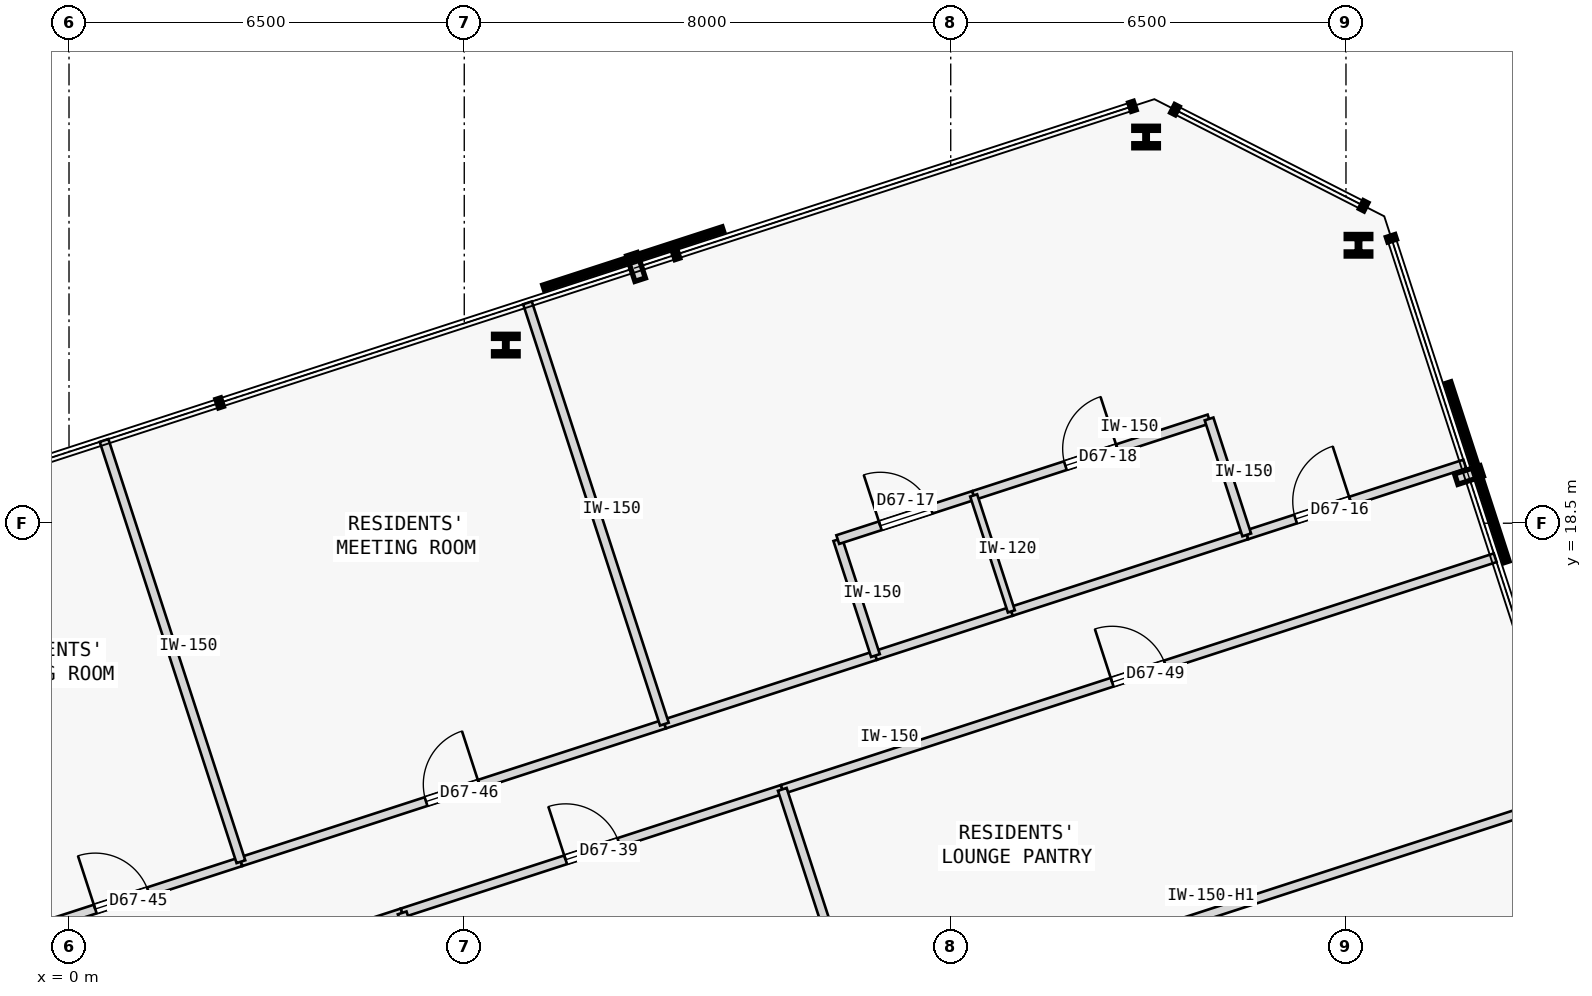
"""IFC4 building model, lengths in metres.
Left out: names, types, materials, properties, quantities, classifications, styles, units other than length and angle.
Written with IfcOpenShell. Run it as: python <this file> out.ifc"""

import sys

from ifc_helpers import new_model, si_unit, direction, frame, frame_2d, origin, origin_2d, place, context, subcontext, project, spatial, rectangle, i_section, extrude, element, fill, save


model = new_model("IFC4")
c1 = context("Model", 3, precision=1e-05, world=origin(), true_north=direction((0.0, 1.0)))
c2 = subcontext(c1, "Body", "Model", "MODEL_VIEW")
j1 = project(units=[si_unit("LENGTHUNIT", "METRE"), si_unit("PLANEANGLEUNIT", "RADIAN")], contexts=[c1])
p1 = place(None, origin())
s1 = spatial("IfcSite", under=j1, at=p1, CompositionType="ELEMENT")
p2 = place(p1, origin())
s2 = spatial("IfcBuilding", under=s1, at=p2, CompositionType="ELEMENT")
p3 = place(p2, frame((0.0, 0.0, 251.1)))
s3 = spatial("IfcBuildingStorey", under=s2, at=p3, CompositionType="ELEMENT", Elevation=251.1)
for number, where, z_axis, x_axis in (
    (1, (21.206, 23.071, 0.0), (0.0, 0.0, 1.0), (1.0, 0.0, 0.0)),
    (2, (17.713, 24.851, 0.0), (0.0, 0.0, 1.0), (1.0, 0.0, 0.0)),
    (3, (7.184, 21.43, 0.0), (0.0, 0.0, 1.0), (1.0, 0.0, 0.0)),
):
    element("IfcColumn", number, at=place(p3, frame(where, z_axis=z_axis, x_axis=x_axis)), inside=s3, PredefinedType="COLUMN", context=c2, shape_type="SweptSolid", body=[
        extrude(i_section(OverallWidth=0.405, OverallDepth=0.355, WebThickness=0.042, FlangeThickness=0.068, FilletRadius=0.015, at=origin_2d()), origin(), (0.0, 0.0, 1.0), 3.35),
    ])
p4 = place(p3, frame((9.791, 15.196, 0.0), z_axis=(0.0, 0.0, 1.0), x_axis=(0.951050780541, 0.309034646652, 0.0)))
e4 = element("IfcWall", 4, at=p4, inside=s3, PredefinedType="PARTITIONING", context=c2, shape_type="SweptSolid", body=[
    extrude(rectangle(XDim=3.65, YDim=0.15, at=frame_2d((1.825, 0.0))), origin(), (0.0, 0.0, 1.0), 2.95),
])
p5 = place(p3, frame((19.368, 18.308, 0.0), z_axis=(0.0, 0.0, 1.0), x_axis=(0.951052151329, 0.309030428036, 0.0)))
e5 = element("IfcWall", 5, at=p5, inside=s3, PredefinedType="PARTITIONING", context=c2, shape_type="SweptSolid", body=[
    extrude(rectangle(XDim=3.77, YDim=0.15, at=frame_2d((1.885, 0.0))), origin(), (0.0, 0.0, 1.0), 2.95),
])
p6 = place(p5, frame((0.844, 0.0, 0.0)))
e6 = element("IfcOpeningElement", 6, at=p6, cuts=e5, PredefinedType="OPENING", context=c2, shape_type="SweptSolid", body=[
    extrude(rectangle(XDim=0.95, YDim=2.15, at=frame_2d((0.475, 1.075))), frame((0.0, 0.085, 0.0), z_axis=(0.0, -1.0, 0.0), x_axis=(1.0, 0.0, 0.0)), (0.0, 0.0, 1.0), 0.17),
])
p7 = place(p3, frame((13.262, 16.324, 0.0), z_axis=(0.0, 0.0, 1.0), x_axis=(0.951045519245, 0.309050837767, 0.0)))
e7 = element("IfcWall", 7, at=p7, inside=s3, PredefinedType="PARTITIONING", context=c2, shape_type="SweptSolid", body=[
    extrude(rectangle(XDim=2.35, YDim=0.15, at=frame_2d((1.175, 0.0))), origin(), (0.0, 0.0, 1.0), 2.95),
])
p8 = place(p3, frame((15.497, 17.051, 0.0), z_axis=(0.0, 0.0, 1.0), x_axis=(0.951067124726, 0.308984343076, 0.0)))
e8 = element("IfcWall", 8, at=p8, inside=s3, PredefinedType="PARTITIONING", context=c2, shape_type="SweptSolid", body=[
    extrude(rectangle(XDim=4.07, YDim=0.15, at=frame_2d((2.035, 0.0))), origin(), (0.0, 0.0, 1.0), 2.95),
])
p9 = place(p3, frame((3.699, 11.514, 0.0), z_axis=(0.0, 0.0, 1.0), x_axis=(0.951069540665, 0.308976906612, 0.0)))
e9 = element("IfcWall", 9, at=p9, inside=s3, PredefinedType="PARTITIONING", context=c2, shape_type="SweptSolid", body=[
    extrude(rectangle(XDim=1.871, YDim=0.15, at=frame_2d((0.936, 0.0))), origin(), (0.0, 0.0, 1.0), 2.95),
])
p10 = place(p3, frame((5.479, 12.092, 0.0), z_axis=(0.0, 0.0, 1.0), x_axis=(0.951051809397, 0.309031480343, 0.0)))
e10 = element("IfcWall", 10, at=p10, inside=s3, PredefinedType="PARTITIONING", context=c2, shape_type="SweptSolid", body=[
    extrude(rectangle(XDim=6.573, YDim=0.15, at=frame_2d((3.287, 0.0))), origin(), (0.0, 0.0, 1.0), 2.95),
])
p11 = place(p10, frame((2.826, 0.0, 0.0)))
e11 = element("IfcOpeningElement", 11, at=p11, cuts=e10, PredefinedType="OPENING", context=c2, shape_type="SweptSolid", body=[
    extrude(rectangle(XDim=0.92, YDim=2.15, at=frame_2d((0.46, 1.075))), frame((0.0, 0.085, 0.0), z_axis=(0.0, -1.0, 0.0), x_axis=(1.0, 0.0, 0.0)), (0.0, 0.0, 1.0), 0.17),
])
p12 = place(p3, frame((-1.089, 11.661, 0.0), z_axis=(0.0, 0.0, 1.0), x_axis=(0.951057158344, 0.309015018346, 0.0)))
e12 = element("IfcWall", 12, at=p12, inside=s3, PredefinedType="PARTITIONING", context=c2, shape_type="SweptSolid", body=[
    extrude(rectangle(XDim=4.118, YDim=0.15, at=frame_2d((2.059, 0.0))), origin(), (0.0, 0.0, 1.0), 2.95),
])
p13 = place(p12, frame((1.599, 0.0, 0.0)))
e13 = element("IfcOpeningElement", 13, at=p13, cuts=e12, PredefinedType="OPENING", context=c2, shape_type="SweptSolid", body=[
    extrude(rectangle(XDim=0.92, YDim=2.15, at=frame_2d((0.46, 1.075))), frame((0.0, 0.085, 0.0), z_axis=(0.0, -1.0, 0.0), x_axis=(1.0, 0.0, 0.0)), (0.0, 0.0, 1.0), 0.17),
])
p14 = place(p3, frame((2.827, 12.934, 0.0), z_axis=(0.0, 0.0, 1.0), x_axis=(0.951056608557, 0.309016710423, 0.0)))
e14 = element("IfcWall", 14, at=p14, inside=s3, PredefinedType="PARTITIONING", context=c2, shape_type="SweptSolid", body=[
    extrude(rectangle(XDim=7.322, YDim=0.15, at=frame_2d((3.661, 0.0))), origin(), (0.0, 0.0, 1.0), 2.95),
])
p15 = place(p14, frame((3.201, 0.0, 0.0)))
e15 = element("IfcOpeningElement", 15, at=p15, cuts=e14, PredefinedType="OPENING", context=c2, shape_type="SweptSolid", body=[
    extrude(rectangle(XDim=0.92, YDim=2.15, at=frame_2d((0.46, 1.075))), frame((0.0, 0.085, 0.0), z_axis=(0.0, -1.0, 0.0), x_axis=(1.0, 0.0, 0.0)), (0.0, 0.0, 1.0), 0.17),
])
p16 = place(p3, frame((11.73, 14.123, 0.0), z_axis=(0.0, 0.0, 1.0), x_axis=(0.951060263663, 0.309005460926, 0.0)))
e16 = element("IfcWall", 16, at=p16, inside=s3, PredefinedType="PARTITIONING", context=c2, shape_type="SweptSolid", body=[
    extrude(rectangle(XDim=12.327, YDim=0.15, at=frame_2d((6.164, 0.0))), origin(), (0.0, 0.0, 1.0), 2.95),
])
p17 = place(p16, frame((5.704, 0.0, 0.0)))
e17 = element("IfcOpeningElement", 17, at=p17, cuts=e16, PredefinedType="OPENING", context=c2, shape_type="SweptSolid", body=[
    extrude(rectangle(XDim=0.92, YDim=2.15, at=frame_2d((0.46, 1.075))), frame((0.0, 0.085, 0.0), z_axis=(0.0, -1.0, 0.0), x_axis=(1.0, 0.0, 0.0)), (0.0, 0.0, 1.0), 0.17),
])
p18 = place(p3, frame((13.262, 16.324, 0.0), z_axis=(0.0, 0.0, 1.0), x_axis=(-0.309022749039, 0.951054646472, 0.0)))
e18 = element("IfcWall", 18, at=p18, inside=s3, PredefinedType="PARTITIONING", context=c2, shape_type="SweptSolid", body=[
    extrude(rectangle(XDim=2.005, YDim=0.15, at=frame_2d((1.002, 0.0))), origin(), (0.0, 0.0, 1.0), 2.95),
])
p19 = place(p3, frame((12.642, 18.231, 0.0), z_axis=(0.0, 0.0, 1.0), x_axis=(0.951076048914, 0.308956872689, 0.0)))
e19 = element("IfcWall", 19, at=p19, inside=s3, PredefinedType="PARTITIONING", context=c2, shape_type="SweptSolid", body=[
    extrude(rectangle(XDim=2.35, YDim=0.15, at=frame_2d((1.175, 0.0))), origin(), (0.0, 0.0, 1.0), 2.95),
])
p20 = place(p19, frame((0.735, 0.0, 0.0)))
e20 = element("IfcOpeningElement", 20, at=p20, cuts=e19, PredefinedType="OPENING", context=c2, shape_type="SweptSolid", body=[
    extrude(rectangle(XDim=0.88, YDim=2.15, at=frame_2d((0.44, 1.075))), frame((0.0, 0.085, 0.0), z_axis=(0.0, -1.0, 0.0), x_axis=(1.0, 0.0, 0.0)), (0.0, 0.0, 1.0), 0.17),
])
p21 = place(p3, frame((14.877, 18.957, 0.0), z_axis=(0.0, 0.0, 1.0), x_axis=(0.95104949593, 0.309038600002, 0.0)))
e21 = element("IfcWall", 21, at=p21, inside=s3, PredefinedType="PARTITIONING", context=c2, shape_type="SweptSolid", body=[
    extrude(rectangle(XDim=4.07, YDim=0.15, at=frame_2d((2.035, 0.0))), origin(), (0.0, 0.0, 1.0), 2.95),
])
p22 = place(p21, frame((1.585, 0.0, 0.0)))
e22 = element("IfcOpeningElement", 22, at=p22, cuts=e21, PredefinedType="OPENING", context=c2, shape_type="SweptSolid", body=[
    extrude(rectangle(XDim=0.9, YDim=2.15, at=frame_2d((0.45, 1.075))), frame((0.0, 0.085, 0.0), z_axis=(0.0, -1.0, 0.0), x_axis=(1.0, 0.0, 0.0)), (0.0, 0.0, 1.0), 0.17),
])
p23 = place(p3, frame((19.368, 18.308, 0.0), z_axis=(0.0, 0.0, 1.0), x_axis=(-0.309022749039, 0.951054646472, 0.0)))
e23 = element("IfcWall", 23, at=p23, inside=s3, PredefinedType="PARTITIONING", context=c2, shape_type="SweptSolid", body=[
    extrude(rectangle(XDim=2.005, YDim=0.15, at=frame_2d((1.002, 0.0))), origin(), (0.0, 0.0, 1.0), 2.95),
])
p24 = place(p3, frame((9.791, 15.196, 0.0), z_axis=(0.0, 0.0, 1.0), x_axis=(-0.309029230739, 0.951052540372, 0.0)))
e24 = element("IfcWall", 24, at=p24, inside=s3, PredefinedType="PARTITIONING", context=c2, shape_type="SweptSolid", body=[
    extrude(rectangle(XDim=7.284, YDim=0.15, at=frame_2d((3.642, 0.0))), origin(), (0.0, 0.0, 1.0), 2.95),
])
p25 = place(p3, frame((15.497, 17.051, 0.0), z_axis=(0.0, 0.0, 1.0), x_axis=(-0.309058537449, 0.951043017129, 0.0)))
e25 = element("IfcWall", 25, at=p25, inside=s3, PredefinedType="PARTITIONING", context=c2, shape_type="SweptSolid", body=[
    extrude(rectangle(XDim=2.005, YDim=0.12, at=frame_2d((1.002, 0.0))), origin(), (0.0, 0.0, 1.0), 2.95),
])
p26 = place(p3, frame((7.588, 5.6, 0.0), z_axis=(0.0, 0.0, 1.0), x_axis=(-0.309018946982, 0.951055881852, 0.0)))
e26 = element("IfcWall", 26, at=p26, inside=s3, PredefinedType="PARTITIONING", context=c2, shape_type="SweptSolid", body=[
    extrude(rectangle(XDim=6.826, YDim=0.15, at=frame_2d((3.413, 0.0))), origin(), (0.0, 0.0, 1.0), 2.95),
])
p27 = place(p3, frame((13.003, 10.206, 0.0), z_axis=(0.0, 0.0, 1.0), x_axis=(-0.309035144366, 0.951050618814, 0.0)))
e27 = element("IfcWall", 27, at=p27, inside=s3, PredefinedType="PARTITIONING", context=c2, shape_type="SweptSolid", body=[
    extrude(rectangle(XDim=4.119, YDim=0.15, at=frame_2d((2.06, 0.0))), origin(), (0.0, 0.0, 1.0), 2.95),
])
p28 = place(p3, frame((2.827, 12.934, 0.0), z_axis=(0.0, 0.0, 1.0), x_axis=(-0.308998913866, 0.951062390819, 0.0)))
e28 = element("IfcWall", 28, at=p28, inside=s3, PredefinedType="PARTITIONING", context=c2, shape_type="SweptSolid", body=[
    extrude(rectangle(XDim=7.284, YDim=0.15, at=frame_2d((3.642, 0.0))), origin(), (0.0, 0.0, 1.0), 2.95),
])
p29 = place(p3, frame((13.003, 10.206, 0.0), z_axis=(0.0, 0.0, 1.0), x_axis=(0.951060263663, 0.309005460926, 0.0)))
e29 = element("IfcWall", 29, at=p29, inside=s3, PredefinedType="PARTITIONING", context=c2, shape_type="SweptSolid", body=[
    extrude(rectangle(XDim=12.327, YDim=0.15, at=frame_2d((6.164, 0.0))), origin(), (0.0, 0.0, 1.0), 2.5),
])
p30 = place(p6, origin())
e30 = element("IfcDoor", 30, at=p30, inside=s3, OperationType="SINGLE_SWING_RIGHT", PredefinedType="DOOR", context=c2, shape_type="SweptSolid", body=[
    extrude(rectangle(XDim=0.95, YDim=2.15, at=frame_2d((0.475, 1.075))), frame((0.0, 0.025, 0.0), z_axis=(0.0, -1.0, 0.0), x_axis=(1.0, 0.0, 0.0)), (0.0, 0.0, 1.0), 0.05),
])
fill(e6, e30)
p31 = place(p20, origin())
e31 = element("IfcDoor", 31, at=p31, inside=s3, OperationType="SINGLE_SWING_LEFT", PredefinedType="DOOR", context=c2, shape_type="SweptSolid", body=[
    extrude(rectangle(XDim=0.88, YDim=2.15, at=frame_2d((0.44, 1.075))), frame((0.0, 0.025, 0.0), z_axis=(0.0, -1.0, 0.0), x_axis=(1.0, 0.0, 0.0)), (0.0, 0.0, 1.0), 0.05),
])
fill(e20, e31)
p32 = place(p22, origin())
e32 = element("IfcDoor", 32, at=p32, inside=s3, OperationType="SINGLE_SWING_RIGHT", PredefinedType="DOOR", context=c2, shape_type="SweptSolid", body=[
    extrude(rectangle(XDim=0.9, YDim=2.15, at=frame_2d((0.45, 1.075))), frame((0.0, 0.025, 0.0), z_axis=(0.0, -1.0, 0.0), x_axis=(1.0, 0.0, 0.0)), (0.0, 0.0, 1.0), 0.05),
])
fill(e22, e32)
p33 = place(p11, origin())
e33 = element("IfcDoor", 33, at=p33, inside=s3, OperationType="SINGLE_SWING_LEFT", PredefinedType="DOOR", context=c2, shape_type="SweptSolid", body=[
    extrude(rectangle(XDim=0.92, YDim=2.15, at=frame_2d((0.46, 1.075))), frame((0.0, 0.025, 0.0), z_axis=(0.0, -1.0, 0.0), x_axis=(1.0, 0.0, 0.0)), (0.0, 0.0, 1.0), 0.05),
])
fill(e11, e33)
p34 = place(p13, origin())
e34 = element("IfcDoor", 34, at=p34, inside=s3, OperationType="SINGLE_SWING_LEFT", PredefinedType="DOOR", context=c2, shape_type="SweptSolid", body=[
    extrude(rectangle(XDim=0.92, YDim=2.15, at=frame_2d((0.46, 1.075))), frame((0.0, 0.025, 0.0), z_axis=(0.0, -1.0, 0.0), x_axis=(1.0, 0.0, 0.0)), (0.0, 0.0, 1.0), 0.05),
])
fill(e13, e34)
p35 = place(p15, origin())
e35 = element("IfcDoor", 35, at=p35, inside=s3, OperationType="SINGLE_SWING_RIGHT", PredefinedType="DOOR", context=c2, shape_type="SweptSolid", body=[
    extrude(rectangle(XDim=0.92, YDim=2.15, at=frame_2d((0.46, 1.075))), frame((0.0, 0.025, 0.0), z_axis=(0.0, -1.0, 0.0), x_axis=(1.0, 0.0, 0.0)), (0.0, 0.0, 1.0), 0.05),
])
fill(e15, e35)
p36 = place(p17, origin())
e36 = element("IfcDoor", 36, at=p36, inside=s3, OperationType="SINGLE_SWING_LEFT", PredefinedType="DOOR", context=c2, shape_type="SweptSolid", body=[
    extrude(rectangle(XDim=0.92, YDim=2.15, at=frame_2d((0.46, 1.075))), frame((0.0, 0.025, 0.0), z_axis=(0.0, -1.0, 0.0), x_axis=(1.0, 0.0, 0.0)), (0.0, 0.0, 1.0), 0.05),
])
fill(e17, e36)
save(model, sys.argv[1])
